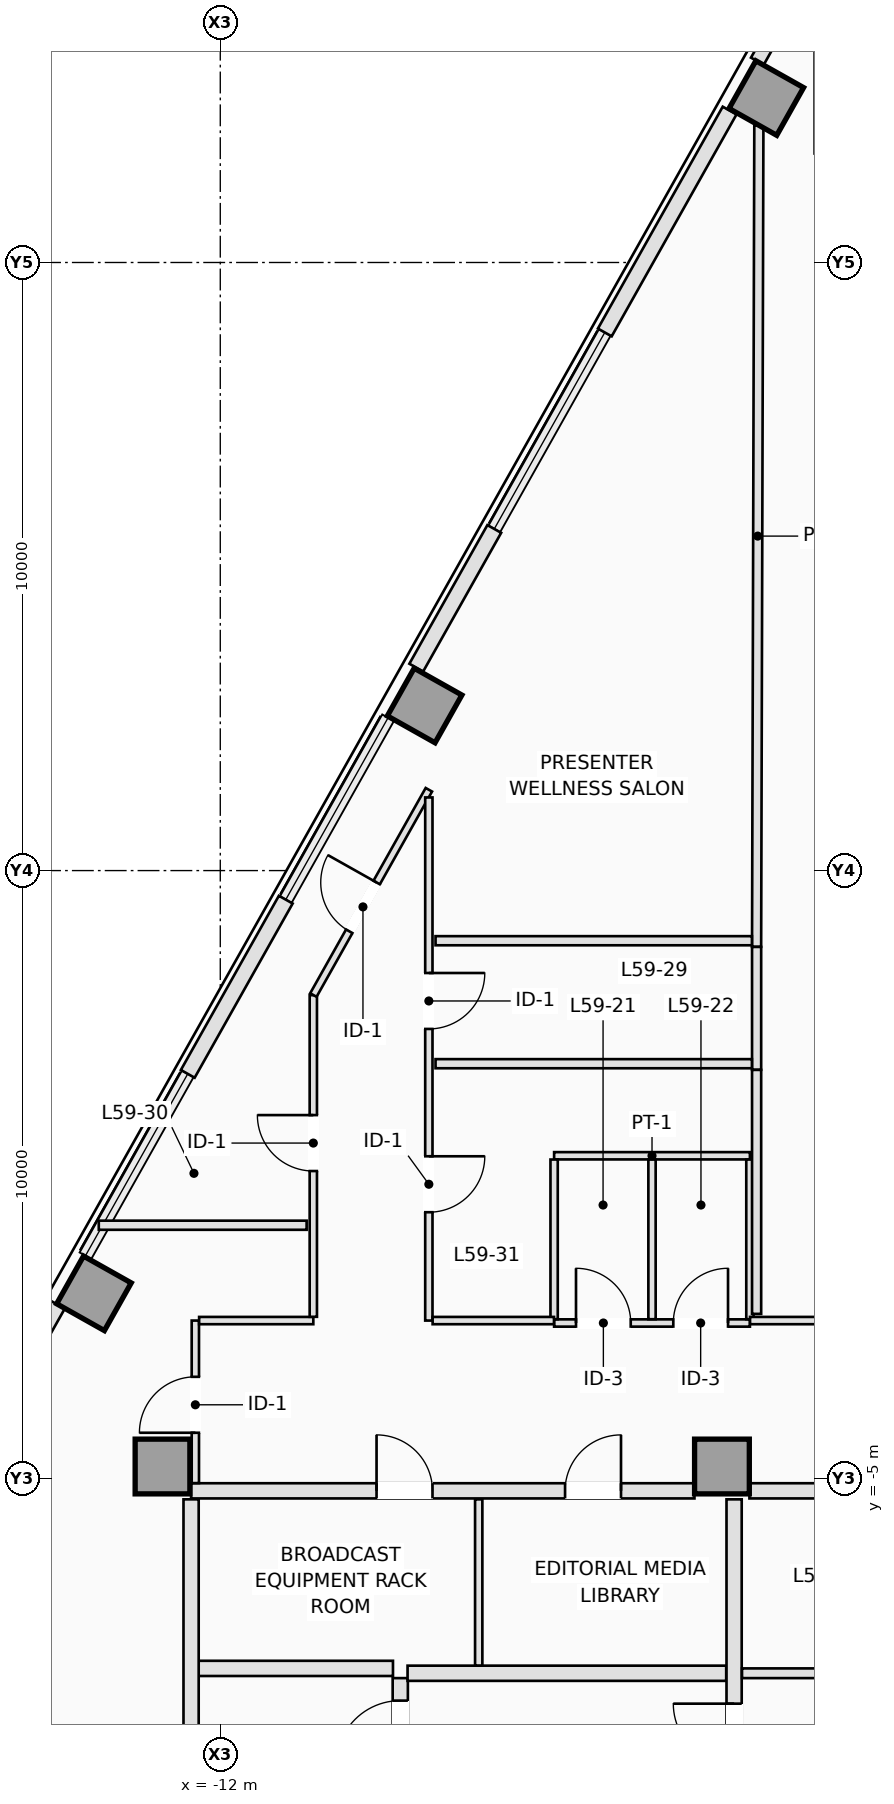
"""IFC4 building model, lengths in metres.
Left out: names, types, materials, properties, quantities, classifications, styles, units other than length and angle.
Written with IfcOpenShell. Run it as: python <this file> out.ifc"""

import sys

from ifc_helpers import new_model, si_unit, direction, frame, frame_2d, origin, origin_2d, place, context, subcontext, project, spatial, rectangle, extrude, element, fill, save


model = new_model("IFC4")
c1 = context("Model", 3, precision=1e-05, world=origin(), true_north=direction((0.0, 1.0)))
c2 = subcontext(c1, "Body", "Model", "MODEL_VIEW")
j1 = project(units=[si_unit("LENGTHUNIT", "METRE"), si_unit("PLANEANGLEUNIT", "RADIAN")], contexts=[c1])
p1 = place(None, origin())
s1 = spatial("IfcSite", under=j1, at=p1, CompositionType="ELEMENT")
p2 = place(p1, origin())
s2 = spatial("IfcBuilding", under=s1, at=p2, CompositionType="ELEMENT")
p3 = place(p2, frame((0.0, 0.0, 214.9)))
s3 = spatial("IfcBuildingStorey", under=s2, at=p3, CompositionType="ELEMENT", Elevation=214.9)
for number, where, z_axis, x_axis in (
    (1, (-12.95, -4.8, 0.0), (0.0, 0.0, 1.0), (1.0, 0.0, 0.0)),
    (2, (-3.75, -4.8, 0.0), (0.0, 0.0, 1.0), (1.0, 0.0, 0.0)),
    (3, (-3.021, 17.704, 0.0), (0.0, 0.0, 1.0), (-0.872, 0.49, 0.0)),
    (4, (-8.64, 7.715, 0.0), (0.0, 0.0, 1.0), (-0.872, 0.49, 0.0)),
    (5, (-14.077, -1.952, 0.0), (0.0, 0.0, 1.0), (-0.872, 0.49, 0.0)),
):
    element("IfcColumn", number, at=place(p3, frame(where, z_axis=z_axis, x_axis=x_axis)), inside=s3, PredefinedType="COLUMN", context=c2, shape_type="SweptSolid", body=[
        extrude(rectangle(XDim=0.9, YDim=0.9, at=origin_2d()), origin(), (0.0, 0.0, 1.0), 3.5),
    ])
p4 = place(p3, frame((-3.168, 18.309, 0.0), z_axis=(0.0, 0.0, 1.0), x_axis=(0.490345412687, 0.87152818443, 0.0)))
e6 = element("IfcWall", 6, at=p4, inside=s3, PredefinedType="STANDARD", context=c2, shape_type="SweptSolid", body=[
    extrude(rectangle(XDim=0.964, YDim=0.24, at=frame_2d((0.482, 0.0))), origin(), (0.0, 0.0, 1.0), 3.25),
])
p5 = place(p3, frame((-19.844, -11.337, 0.0), z_axis=(0.0, 0.0, 1.0), x_axis=(0.490246958575, 0.871583570066, 0.0)))
e7 = element("IfcWall", 7, at=p5, inside=s3, PredefinedType="STANDARD", context=c2, shape_type="SweptSolid", body=[
    extrude(rectangle(XDim=10.552, YDim=0.26, at=frame_2d((5.276, 0.0))), origin(), (0.0, 0.0, 1.0), 3.25),
])
p6 = place(p3, frame((-8.777, 8.337, 0.0), z_axis=(0.0, 0.0, 1.0), x_axis=(0.490301099378, 0.871553114818, 0.0)))
e8 = element("IfcWall", 8, at=p6, inside=s3, PredefinedType="STANDARD", context=c2, shape_type="SweptSolid", body=[
    extrude(rectangle(XDim=2.617, YDim=0.26, at=frame_2d((1.309, 0.0))), origin(), (0.0, 0.0, 1.0), 3.25),
])
p7 = place(p3, frame((-5.677, 13.85, 0.0), z_axis=(0.0, 0.0, 1.0), x_axis=(0.490275081837, 0.87156775074, 0.0)))
e9 = element("IfcWall", 9, at=p7, inside=s3, PredefinedType="STANDARD", context=c2, shape_type="SweptSolid", body=[
    extrude(rectangle(XDim=4.187, YDim=0.26, at=frame_2d((2.094, 0.0))), origin(), (0.0, 0.0, 1.0), 3.25),
])
p8 = place(p3, frame((-12.535, 1.657, 0.0), z_axis=(0.0, 0.0, 1.0), x_axis=(0.490264765862, 0.871573553611, 0.0)))
e10 = element("IfcWall", 10, at=p8, inside=s3, PredefinedType="STANDARD", context=c2, shape_type="SweptSolid", body=[
    extrude(rectangle(XDim=3.287, YDim=0.26, at=frame_2d((1.644, 0.0))), origin(), (0.0, 0.0, 1.0), 3.25),
])
p9 = place(p3, frame((-2.106, 16.792, 0.0), z_axis=(0.0, 0.0, 1.0), x_axis=(0.0, 1.0, 0.0)))
e11 = element("IfcWall", 11, at=p9, inside=s3, PredefinedType="STANDARD", context=c2, shape_type="SweptSolid", body=[
    extrude(rectangle(XDim=2.36, YDim=0.24, at=frame_2d((1.18, 0.0))), origin(), (0.0, 0.0, 1.0), 3.25),
])
p10 = place(p3, frame((-9.04, -10.18, 0.0), z_axis=(0.0, 0.0, 1.0), x_axis=(0.0, 1.0, 0.0)))
e12 = element("IfcWall", 12, at=p10, inside=s3, PredefinedType="PARTITIONING", context=c2, shape_type="SweptSolid", body=[
    extrude(rectangle(XDim=1.9, YDim=0.25, at=frame_2d((0.95, 0.0))), origin(), (0.0, 0.0, 1.0), 3.25),
])
p11 = place(p10, frame((0.48, 0.0, 0.0)))
e13 = element("IfcOpeningElement", 13, at=p11, cuts=e12, PredefinedType="OPENING", context=c2, shape_type="SweptSolid", body=[
    extrude(rectangle(XDim=1.05, YDim=2.15, at=frame_2d((0.525, 1.075))), frame((0.0, 0.135, 0.0), z_axis=(0.0, -1.0, 0.0), x_axis=(1.0, 0.0, 0.0)), (0.0, 0.0, 1.0), 0.27),
])
p12 = place(p3, frame((-12.38, -8.12, 0.0), z_axis=(0.0, 0.0, 1.0), x_axis=(1.0, 0.0, 0.0)))
e14 = element("IfcWall", 14, at=p12, inside=s3, PredefinedType="PARTITIONING", context=c2, shape_type="SweptSolid", body=[
    extrude(rectangle(XDim=3.22, YDim=0.25, at=frame_2d((1.61, 0.0))), origin(), (0.0, 0.0, 1.0), 3.25),
])
p13 = place(p3, frame((-12.48, -10.18, 0.0), z_axis=(0.0, 0.0, 1.0), x_axis=(0.0, 1.0, 0.0)))
e15 = element("IfcWall", 15, at=p13, inside=s3, PredefinedType="PARTITIONING", context=c2, shape_type="SweptSolid", body=[
    extrude(rectangle(XDim=4.84, YDim=0.25, at=frame_2d((2.42, 0.0))), origin(), (0.0, 0.0, 1.0), 3.25),
])
p14 = place(p3, frame((-8.92, -8.2, 0.0), z_axis=(0.0, 0.0, 1.0), x_axis=(1.0, 0.0, 0.0)))
e16 = element("IfcWall", 16, at=p14, inside=s3, PredefinedType="PARTITIONING", context=c2, shape_type="SweptSolid", body=[
    extrude(rectangle(XDim=5.24, YDim=0.25, at=frame_2d((2.62, 0.0))), origin(), (0.0, 0.0, 1.0), 3.25),
])
p15 = place(p3, frame((-3.55, -15.898, 0.0), z_axis=(0.0, 0.0, 1.0), x_axis=(0.0, 1.0, 0.0)))
e17 = element("IfcWall", 17, at=p15, inside=s3, PredefinedType="PARTITIONING", context=c2, shape_type="SweptSolid", body=[
    extrude(rectangle(XDim=10.558, YDim=0.25, at=frame_2d((5.279, 0.0))), origin(), (0.0, 0.0, 1.0), 3.25),
])
p16 = place(p15, frame((6.198, 0.0, 0.0)))
e18 = element("IfcOpeningElement", 18, at=p16, cuts=e17, PredefinedType="OPENING", context=c2, shape_type="SweptSolid", body=[
    extrude(rectangle(XDim=1.0, YDim=2.15, at=frame_2d((0.5, 1.075))), frame((0.0, 0.135, 0.0), z_axis=(0.0, -1.0, 0.0), x_axis=(1.0, 0.0, 0.0)), (0.0, 0.0, 1.0), 0.27),
])
p17 = place(p3, frame((-12.48, -5.2, 0.0), z_axis=(0.0, 0.0, 1.0), x_axis=(1.0, 0.0, 0.0)))
e19 = element("IfcWall", 19, at=p17, inside=s3, PredefinedType="PARTITIONING", context=c2, shape_type="SweptSolid", body=[
    extrude(rectangle(XDim=8.278, YDim=0.25, at=frame_2d((4.139, 0.0))), origin(), (0.0, 0.0, 1.0), 3.25),
])
p18 = place(p17, frame((3.05, 0.0, 0.0)))
e20 = element("IfcOpeningElement", 20, at=p18, cuts=e19, PredefinedType="OPENING", context=c2, shape_type="SweptSolid", body=[
    extrude(rectangle(XDim=0.92, YDim=2.12, at=frame_2d((0.46, 1.06))), frame((0.0, 0.135, 0.0), z_axis=(0.0, -1.0, 0.0), x_axis=(1.0, 0.0, 0.0)), (0.0, 0.0, 1.0), 0.27),
])
p19 = place(p17, frame((6.15, 0.0, 0.0)))
e21 = element("IfcOpeningElement", 21, at=p19, cuts=e19, PredefinedType="OPENING", context=c2, shape_type="SweptSolid", body=[
    extrude(rectangle(XDim=0.92, YDim=2.12, at=frame_2d((0.46, 1.06))), frame((0.0, 0.135, 0.0), z_axis=(0.0, -1.0, 0.0), x_axis=(1.0, 0.0, 0.0)), (0.0, 0.0, 1.0), 0.27),
])
p20 = place(p3, frame((-3.298, -5.2, 0.0), z_axis=(0.0, 0.0, 1.0), x_axis=(1.0, 0.0, 0.0)))
e22 = element("IfcWall", 22, at=p20, inside=s3, PredefinedType="PARTITIONING", context=c2, shape_type="SweptSolid", body=[
    extrude(rectangle(XDim=2.348, YDim=0.25, at=frame_2d((1.174, 0.0))), origin(), (0.0, 0.0, 1.0), 3.25),
])
p21 = place(p3, frame((-7.75, -8.073, 0.0), z_axis=(0.0, 0.0, 1.0), x_axis=(0.0, 1.0, 0.0)))
e23 = element("IfcWall", 23, at=p21, inside=s3, PredefinedType="PARTITIONING", context=c2, shape_type="SweptSolid", body=[
    extrude(rectangle(XDim=2.733, YDim=0.12, at=frame_2d((1.366, 0.0))), origin(), (0.0, 0.0, 1.0), 3.25),
])
p22 = place(p3, frame((-3.42, -8.2, 0.0), z_axis=(0.0, 0.0, 1.0), x_axis=(1.0, 0.0, 0.0)))
e24 = element("IfcWall", 24, at=p22, inside=s3, PredefinedType="PARTITIONING", context=c2, shape_type="SweptSolid", body=[
    extrude(rectangle(XDim=6.84, YDim=0.16, at=frame_2d((3.42, 0.0))), origin(), (0.0, 0.0, 1.0), 3.25),
])
p23 = place(p22, frame((2.92, 0.0, 0.0)))
e25 = element("IfcOpeningElement", 25, at=p23, cuts=e24, PredefinedType="OPENING", context=c2, shape_type="SweptSolid", body=[
    extrude(rectangle(XDim=1.0, YDim=2.15, at=frame_2d((0.5, 1.075))), frame((0.0, 0.09, 0.0), z_axis=(0.0, -1.0, 0.0), x_axis=(1.0, 0.0, 0.0)), (0.0, 0.0, 1.0), 0.18),
])
p24 = place(p3, frame((-6.51, -2.44, 0.0), z_axis=(0.0, 0.0, 1.0), x_axis=(1.0, 0.0, 0.0)))
e26 = element("IfcWall", 26, at=p24, inside=s3, PredefinedType="PARTITIONING", context=c2, shape_type="SweptSolid", body=[
    extrude(rectangle(XDim=3.22, YDim=0.12, at=frame_2d((1.61, 0.0))), origin(), (0.0, 0.0, 1.0), 2.943),
])
p25 = place(p24, frame((0.36, 0.0, 0.0)))
e27 = element("IfcOpeningElement", 27, at=p25, cuts=e26, PredefinedType="OPENING", context=c2, shape_type="SweptSolid", body=[
    extrude(rectangle(XDim=0.9, YDim=2.12, at=frame_2d((0.45, 1.06))), frame((0.0, 0.07, 0.0), z_axis=(0.0, -1.0, 0.0), x_axis=(1.0, 0.0, 0.0)), (0.0, 0.0, 1.0), 0.14),
])
p26 = place(p24, frame((1.96, 0.0, 0.0)))
e28 = element("IfcOpeningElement", 28, at=p26, cuts=e26, PredefinedType="OPENING", context=c2, shape_type="SweptSolid", body=[
    extrude(rectangle(XDim=0.9, YDim=2.12, at=frame_2d((0.45, 1.06))), frame((0.0, 0.07, 0.0), z_axis=(0.0, -1.0, 0.0), x_axis=(1.0, 0.0, 0.0)), (0.0, 0.0, 1.0), 0.14),
])
p27 = place(p3, frame((-6.51, 0.31, 0.0), z_axis=(0.0, 0.0, 1.0), x_axis=(1.0, 0.0, 0.0)))
e29 = element("IfcWall", 29, at=p27, inside=s3, PredefinedType="PARTITIONING", context=c2, shape_type="SweptSolid", body=[
    extrude(rectangle(XDim=3.22, YDim=0.12, at=frame_2d((1.61, 0.0))), origin(), (0.0, 0.0, 1.0), 3.25),
])
for number, where, z_axis, x_axis in (
    (30, (-6.51, -2.378, 0.0), (0.0, 0.0, 1.0), (0.0, 1.0, 0.0)),
    (31, (-4.9, -2.378, 0.0), (0.0, 0.0, 1.0), (0.0, 1.0, 0.0)),
    (32, (-3.29, -2.378, 0.0), (0.0, 0.0, 1.0), (0.0, 1.0, 0.0)),
):
    element("IfcWall", number, at=place(p3, frame(where, z_axis=z_axis, x_axis=x_axis)), inside=s3, PredefinedType="PARTITIONING", context=c2, shape_type="SweptSolid", body=[
        extrude(rectangle(XDim=2.626, YDim=0.12, at=frame_2d((1.313, 0.0))), origin(), (0.0, 0.0, 1.0), 3.25),
    ])
p28 = place(p3, frame((-12.41, -5.073, 0.0), z_axis=(0.0, 0.0, 1.0), x_axis=(0.0, 1.0, 0.0)))
e33 = element("IfcWall", 33, at=p28, inside=s3, PredefinedType="PARTITIONING", context=c2, shape_type="SweptSolid", body=[
    extrude(rectangle(XDim=2.673, YDim=0.12, at=frame_2d((1.336, 0.0))), origin(), (0.0, 0.0, 1.0), 3.25),
])
p29 = place(p28, frame((0.828, 0.0, 0.0)))
e34 = element("IfcOpeningElement", 34, at=p29, cuts=e33, PredefinedType="OPENING", context=c2, shape_type="SweptSolid", body=[
    extrude(rectangle(XDim=0.92, YDim=2.12, at=frame_2d((0.46, 1.06))), frame((0.0, 0.07, 0.0), z_axis=(0.0, -1.0, 0.0), x_axis=(1.0, 0.0, 0.0)), (0.0, 0.0, 1.0), 0.14),
])
p30 = place(p3, frame((-12.348, -2.4, 0.0), z_axis=(0.0, 0.0, 1.0), x_axis=(1.0, 0.0, 0.0)))
e35 = element("IfcWall", 35, at=p30, inside=s3, PredefinedType="PARTITIONING", context=c2, shape_type="SweptSolid", body=[
    extrude(rectangle(XDim=1.878, YDim=0.12, at=frame_2d((0.939, 0.0))), origin(), (0.0, 0.0, 1.0), 3.25),
])
p31 = place(p3, frame((-10.47, -2.338, 0.0), z_axis=(0.0, 0.0, 1.0), x_axis=(0.0, 1.0, 0.0)))
e36 = element("IfcWall", 36, at=p31, inside=s3, PredefinedType="PARTITIONING", context=c2, shape_type="SweptSolid", body=[
    extrude(rectangle(XDim=5.289, YDim=0.12, at=frame_2d((2.645, 0.0))), origin(), (0.0, 0.0, 1.0), 3.25),
])
p32 = place(p31, frame((2.397, 0.0, 0.0)))
e37 = element("IfcOpeningElement", 37, at=p32, cuts=e36, PredefinedType="OPENING", context=c2, shape_type="SweptSolid", body=[
    extrude(rectangle(XDim=0.92, YDim=2.12, at=frame_2d((0.46, 1.06))), frame((0.0, 0.07, 0.0), z_axis=(0.0, -1.0, 0.0), x_axis=(1.0, 0.0, 0.0)), (0.0, 0.0, 1.0), 0.14),
])
p33 = place(p3, frame((-10.469, 2.953, 0.0), z_axis=(0.0, 0.0, 1.0), x_axis=(0.490276203052, 0.871567120032, 0.0)))
e38 = element("IfcWall", 38, at=p33, inside=s3, PredefinedType="PARTITIONING", context=c2, shape_type="SweptSolid", body=[
    extrude(rectangle(XDim=3.873, YDim=0.12, at=frame_2d((1.937, 0.0))), origin(), (0.0, 0.0, 1.0), 3.25),
])
p34 = place(p33, frame((1.203, 0.0, 0.0)))
e39 = element("IfcOpeningElement", 39, at=p34, cuts=e38, PredefinedType="OPENING", context=c2, shape_type="SweptSolid", body=[
    extrude(rectangle(XDim=0.92, YDim=2.12, at=frame_2d((0.46, 1.06))), frame((0.0, 0.07, 0.0), z_axis=(0.0, -1.0, 0.0), x_axis=(1.0, 0.0, 0.0)), (0.0, 0.0, 1.0), 0.14),
])
p35 = place(p3, frame((-8.57, 6.203, 0.0), z_axis=(0.0, 0.0, 1.0), x_axis=(0.0, -1.0, 0.0)))
e40 = element("IfcWall", 40, at=p35, inside=s3, PredefinedType="PARTITIONING", context=c2, shape_type="SweptSolid", body=[
    extrude(rectangle(XDim=8.603, YDim=0.12, at=frame_2d((4.301, 0.0))), origin(), (0.0, 0.0, 1.0), 3.25),
])
p36 = place(p35, frame((2.887, 0.0, 0.0)))
e41 = element("IfcOpeningElement", 41, at=p36, cuts=e40, PredefinedType="OPENING", context=c2, shape_type="SweptSolid", body=[
    extrude(rectangle(XDim=0.92, YDim=2.12, at=frame_2d((0.46, 1.06))), frame((0.0, 0.07, 0.0), z_axis=(0.0, -1.0, 0.0), x_axis=(1.0, 0.0, 0.0)), (0.0, 0.0, 1.0), 0.14),
])
p37 = place(p35, frame((5.901, 0.0, 0.0)))
e42 = element("IfcOpeningElement", 42, at=p37, cuts=e40, PredefinedType="OPENING", context=c2, shape_type="SweptSolid", body=[
    extrude(rectangle(XDim=0.92, YDim=2.12, at=frame_2d((0.46, 1.06))), frame((0.0, 0.07, 0.0), z_axis=(0.0, -1.0, 0.0), x_axis=(1.0, 0.0, 0.0)), (0.0, 0.0, 1.0), 0.14),
])
p38 = place(p3, frame((-8.508, -2.4, 0.0), z_axis=(0.0, 0.0, 1.0), x_axis=(1.0, 0.0, 0.0)))
e43 = element("IfcWall", 43, at=p38, inside=s3, PredefinedType="PARTITIONING", context=c2, shape_type="SweptSolid", body=[
    extrude(rectangle(XDim=1.996, YDim=0.12, at=frame_2d((0.998, 0.0))), origin(), (0.0, 0.0, 1.0), 3.25),
])
p39 = place(p3, frame((-3.288, -2.4, 0.0), z_axis=(0.0, 0.0, 1.0), x_axis=(1.0, 0.0, 0.0)))
e44 = element("IfcWall", 44, at=p39, inside=s3, PredefinedType="PARTITIONING", context=c2, shape_type="SweptSolid", body=[
    extrude(rectangle(XDim=6.576, YDim=0.12, at=frame_2d((3.288, 0.0))), origin(), (0.0, 0.0, 1.0), 2.943),
])
p40 = place(p39, frame((2.893, 0.0, 0.0)))
e45 = element("IfcOpeningElement", 45, at=p40, cuts=e44, PredefinedType="OPENING", context=c2, shape_type="SweptSolid", body=[
    extrude(rectangle(XDim=0.92, YDim=2.12, at=frame_2d((0.46, 1.06))), frame((0.0, 0.07, 0.0), z_axis=(0.0, -1.0, 0.0), x_axis=(1.0, 0.0, 0.0)), (0.0, 0.0, 1.0), 0.14),
])
p41 = place(p3, frame((-3.143, 17.254, 0.0), z_axis=(0.0, 0.0, 1.0), x_axis=(-0.002783390028, -0.999996126362, 0.0)))
e46 = element("IfcWall", 46, at=p41, inside=s3, PredefinedType="PARTITIONING", context=c2, shape_type="SweptSolid", body=[
    extrude(rectangle(XDim=13.508, YDim=0.15, at=frame_2d((6.754, 0.0))), origin(), (0.0, 0.0, 1.0), 2.722),
])
p42 = place(p3, frame((-3.257, 3.846, 0.0), z_axis=(0.0, 0.0, 1.0), x_axis=(-1.0, 0.0, 0.0)))
e47 = element("IfcWall", 47, at=p42, inside=s3, PredefinedType="PARTITIONING", context=c2, shape_type="SweptSolid", body=[
    extrude(rectangle(XDim=5.203, YDim=0.15, at=frame_2d((2.602, 0.0))), origin(), (0.0, 0.0, 1.0), 2.943),
])
p43 = place(p3, frame((-3.18, 1.724, 0.0), z_axis=(0.0, 0.0, 1.0), x_axis=(0.0, 1.0, 0.0)))
e48 = element("IfcWall", 48, at=p43, inside=s3, PredefinedType="PARTITIONING", context=c2, shape_type="SweptSolid", body=[
    extrude(rectangle(XDim=2.02, YDim=0.15, at=frame_2d((1.01, 0.0))), origin(), (0.0, 0.0, 1.0), 3.25),
])
p44 = place(p3, frame((-3.18, -2.29, 0.0), z_axis=(0.0, 0.0, 1.0), x_axis=(0.0, 1.0, 0.0)))
e49 = element("IfcWall", 49, at=p44, inside=s3, PredefinedType="PARTITIONING", context=c2, shape_type="SweptSolid", body=[
    extrude(rectangle(XDim=4.012, YDim=0.15, at=frame_2d((2.006, 0.0))), origin(), (0.0, 0.0, 1.0), 3.25),
])
p45 = place(p3, frame((-3.257, 1.824, 0.0), z_axis=(0.0, 0.0, 1.0), x_axis=(-1.0, 0.0, 0.0)))
e50 = element("IfcWall", 50, at=p45, inside=s3, PredefinedType="PARTITIONING", context=c2, shape_type="SweptSolid", body=[
    extrude(rectangle(XDim=5.203, YDim=0.15, at=frame_2d((2.602, 0.0))), origin(), (0.0, 0.0, 1.0), 3.25),
])
p46 = place(p3, frame((-10.58, -0.832, 0.0), z_axis=(0.0, 0.0, 1.0), x_axis=(-1.0, 0.0, 0.0)))
e51 = element("IfcWall", 51, at=p46, inside=s3, PredefinedType="PARTITIONING", context=c2, shape_type="SweptSolid", body=[
    extrude(rectangle(XDim=3.418, YDim=0.15, at=frame_2d((1.709, 0.0))), origin(), (0.0, 0.0, 1.0), 3.25),
])
p47 = place(p11, origin())
e52 = element("IfcDoor", 52, at=p47, inside=s3, OperationType="SINGLE_SWING_LEFT", PredefinedType="DOOR", context=c2, shape_type="SweptSolid", body=[
    extrude(rectangle(XDim=1.05, YDim=2.15, at=frame_2d((0.525, 1.075))), frame((0.0, 0.025, 0.0), z_axis=(0.0, -1.0, 0.0), x_axis=(1.0, 0.0, 0.0)), (0.0, 0.0, 1.0), 0.05),
])
fill(e13, e52)
p48 = place(p16, origin())
e53 = element("IfcDoor", 53, at=p48, inside=s3, OperationType="SINGLE_SWING_RIGHT", PredefinedType="DOOR", context=c2, shape_type="SweptSolid", body=[
    extrude(rectangle(XDim=1.0, YDim=2.15, at=frame_2d((0.5, 1.075))), frame((0.0, 0.025, 0.0), z_axis=(0.0, -1.0, 0.0), x_axis=(1.0, 0.0, 0.0)), (0.0, 0.0, 1.0), 0.05),
])
fill(e18, e53)
p49 = place(p18, origin())
e54 = element("IfcDoor", 54, at=p49, inside=s3, OperationType="SINGLE_SWING_LEFT", PredefinedType="DOOR", context=c2, shape_type="SweptSolid", body=[
    extrude(rectangle(XDim=0.92, YDim=2.12, at=frame_2d((0.46, 1.06))), frame((0.0, 0.025, 0.0), z_axis=(0.0, -1.0, 0.0), x_axis=(1.0, 0.0, 0.0)), (0.0, 0.0, 1.0), 0.05),
])
fill(e20, e54)
p50 = place(p19, origin())
e55 = element("IfcDoor", 55, at=p50, inside=s3, OperationType="SINGLE_SWING_RIGHT", PredefinedType="DOOR", context=c2, shape_type="SweptSolid", body=[
    extrude(rectangle(XDim=0.92, YDim=2.12, at=frame_2d((0.46, 1.06))), frame((0.0, 0.025, 0.0), z_axis=(0.0, -1.0, 0.0), x_axis=(1.0, 0.0, 0.0)), (0.0, 0.0, 1.0), 0.05),
])
fill(e21, e55)
p51 = place(p25, origin())
e56 = element("IfcDoor", 56, at=p51, inside=s3, OperationType="SINGLE_SWING_LEFT", PredefinedType="DOOR", context=c2, shape_type="SweptSolid", body=[
    extrude(rectangle(XDim=0.9, YDim=2.12, at=frame_2d((0.45, 1.06))), frame((0.0, 0.025, 0.0), z_axis=(0.0, -1.0, 0.0), x_axis=(1.0, 0.0, 0.0)), (0.0, 0.0, 1.0), 0.05),
])
fill(e27, e56)
p52 = place(p26, origin())
e57 = element("IfcDoor", 57, at=p52, inside=s3, OperationType="SINGLE_SWING_RIGHT", PredefinedType="DOOR", context=c2, shape_type="SweptSolid", body=[
    extrude(rectangle(XDim=0.9, YDim=2.12, at=frame_2d((0.45, 1.06))), frame((0.0, 0.025, 0.0), z_axis=(0.0, -1.0, 0.0), x_axis=(1.0, 0.0, 0.0)), (0.0, 0.0, 1.0), 0.05),
])
fill(e28, e57)
p53 = place(p34, origin())
e58 = element("IfcDoor", 58, at=p53, inside=s3, OperationType="SINGLE_SWING_RIGHT", PredefinedType="DOOR", context=c2, shape_type="SweptSolid", body=[
    extrude(rectangle(XDim=0.92, YDim=2.12, at=frame_2d((0.46, 1.06))), frame((0.0, 0.025, 0.0), z_axis=(0.0, -1.0, 0.0), x_axis=(1.0, 0.0, 0.0)), (0.0, 0.0, 1.0), 0.05),
])
fill(e39, e58)
p54 = place(p36, origin())
e59 = element("IfcDoor", 59, at=p54, inside=s3, OperationType="SINGLE_SWING_LEFT", PredefinedType="DOOR", context=c2, shape_type="SweptSolid", body=[
    extrude(rectangle(XDim=0.92, YDim=2.12, at=frame_2d((0.46, 1.06))), frame((0.0, 0.025, 0.0), z_axis=(0.0, -1.0, 0.0), x_axis=(1.0, 0.0, 0.0)), (0.0, 0.0, 1.0), 0.05),
])
fill(e41, e59)
p55 = place(p32, origin())
e60 = element("IfcDoor", 60, at=p55, inside=s3, OperationType="SINGLE_SWING_RIGHT", PredefinedType="DOOR", context=c2, shape_type="SweptSolid", body=[
    extrude(rectangle(XDim=0.92, YDim=2.12, at=frame_2d((0.46, 1.06))), frame((0.0, 0.025, 0.0), z_axis=(0.0, -1.0, 0.0), x_axis=(1.0, 0.0, 0.0)), (0.0, 0.0, 1.0), 0.05),
])
fill(e37, e60)
p56 = place(p37, origin())
e61 = element("IfcDoor", 61, at=p56, inside=s3, OperationType="SINGLE_SWING_LEFT", PredefinedType="DOOR", context=c2, shape_type="SweptSolid", body=[
    extrude(rectangle(XDim=0.92, YDim=2.12, at=frame_2d((0.46, 1.06))), frame((0.0, 0.025, 0.0), z_axis=(0.0, -1.0, 0.0), x_axis=(1.0, 0.0, 0.0)), (0.0, 0.0, 1.0), 0.05),
])
fill(e42, e61)
p57 = place(p29, origin())
e62 = element("IfcDoor", 62, at=p57, inside=s3, OperationType="SINGLE_SWING_LEFT", PredefinedType="DOOR", context=c2, shape_type="SweptSolid", body=[
    extrude(rectangle(XDim=0.92, YDim=2.12, at=frame_2d((0.46, 1.06))), frame((0.0, 0.025, 0.0), z_axis=(0.0, -1.0, 0.0), x_axis=(1.0, 0.0, 0.0)), (0.0, 0.0, 1.0), 0.05),
])
fill(e34, e62)
save(model, sys.argv[1])
